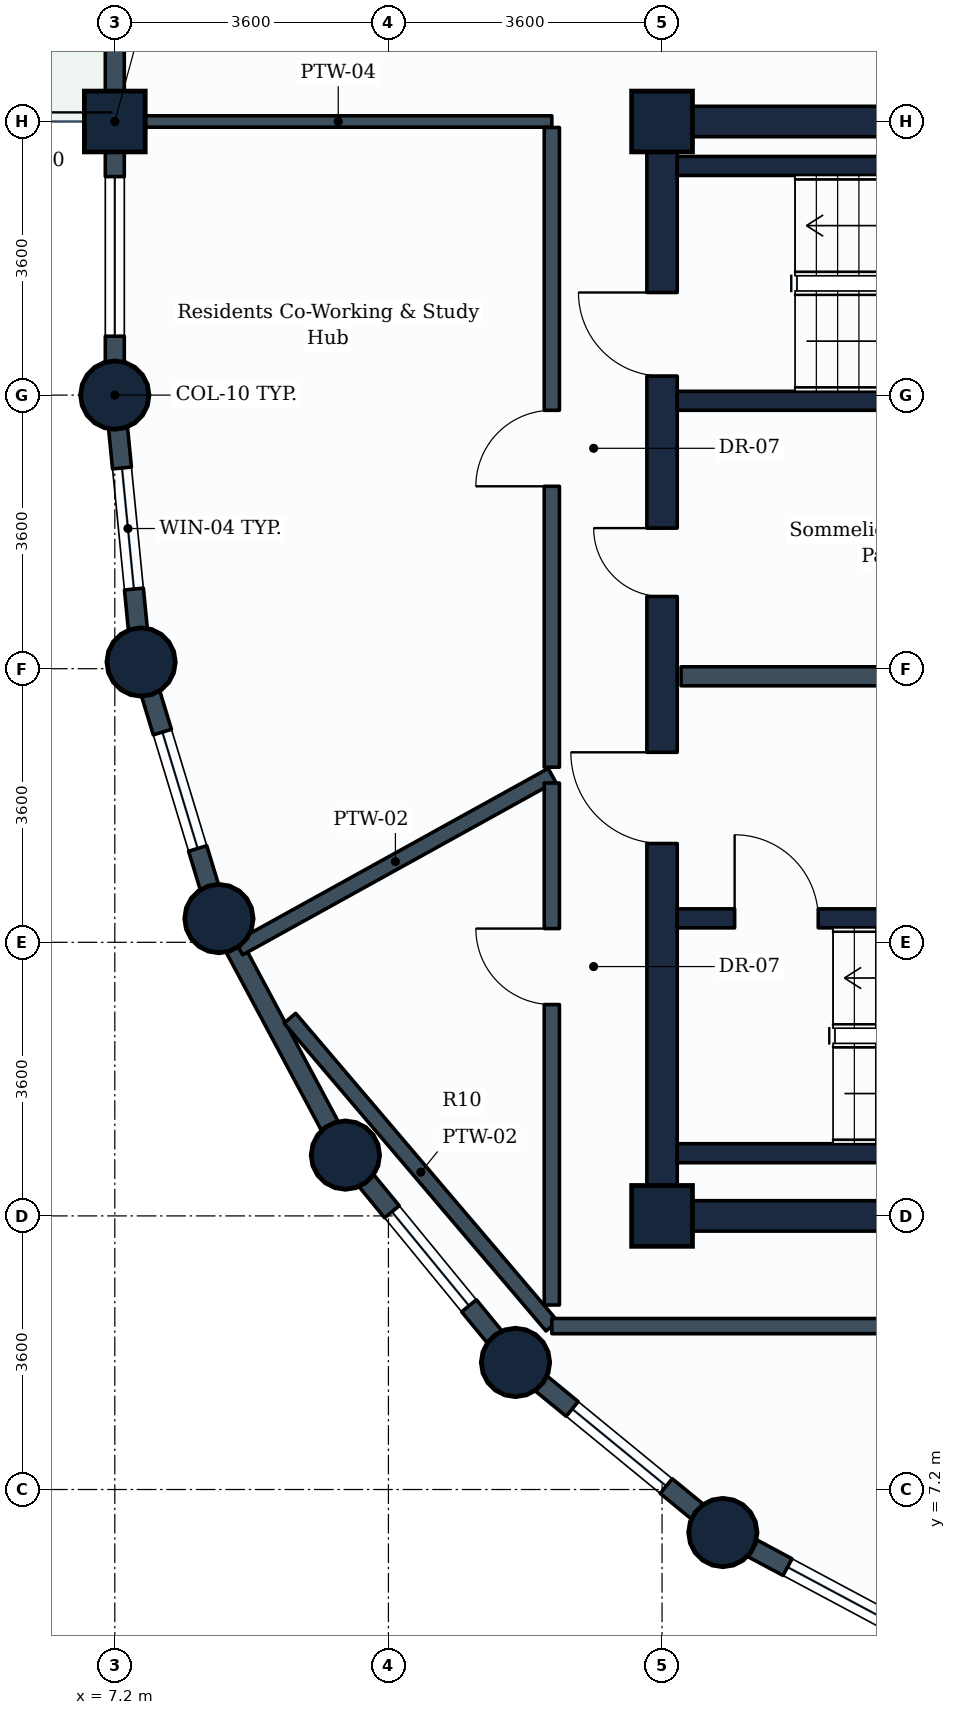
"""IFC4 building model, lengths in metres.
Left out: names, types, materials, properties, quantities, classifications, styles, units other than length and angle.
Written with IfcOpenShell. Run it as: python <this file> out.ifc"""

import sys

from ifc_helpers import new_model, si_unit, direction, frame, frame_2d, origin, origin_2d, place, context, subcontext, project, spatial, rectangle, circle, extrude, element, fill, save


model = new_model("IFC4")
c1 = context("Model", 3, precision=1e-05, world=origin(), true_north=direction((0.0, 1.0)))
c2 = subcontext(c1, "Body", "Model", "MODEL_VIEW")
j1 = project(units=[si_unit("LENGTHUNIT", "METRE"), si_unit("PLANEANGLEUNIT", "RADIAN")], contexts=[c1])
p1 = place(None, origin())
s1 = spatial("IfcSite", under=j1, at=p1, CompositionType="ELEMENT")
p2 = place(p1, origin())
s2 = spatial("IfcBuilding", under=s1, at=p2, CompositionType="ELEMENT")
p3 = place(p2, frame((0.0, 0.0, 270.2)))
s3 = spatial("IfcBuildingStorey", under=s2, at=p3, CompositionType="ELEMENT", Elevation=270.2)
p4 = place(p3, frame((7.2, 21.6, 0.0), z_axis=(0.0, 0.0, 1.0), x_axis=(1.0, 0.0, 0.0)))
e1 = element("IfcColumn", 1, at=p4, inside=s3, PredefinedType="COLUMN", context=c2, shape_type="SweptSolid", body=[
    extrude(circle(Radius=0.45, at=origin_2d()), origin(), (0.0, 0.0, 1.0), 3.6),
])
p5 = place(p3, frame((7.2, 25.2, 0.0), z_axis=(0.0, 0.0, 1.0), x_axis=(0.0, 1.0, 0.0)))
e2 = element("IfcColumn", 2, at=p5, inside=s3, PredefinedType="COLUMN", context=c2, shape_type="SweptSolid", body=[
    extrude(rectangle(XDim=0.8, YDim=0.8, at=origin_2d()), origin(), (0.0, 0.0, 1.0), 3.6),
])
for number, where, z_axis, x_axis in (
    (3, (7.546, 18.088, 0.0), (0.0, 0.0, 1.0), (1.0, 0.0, 0.0)),
    (4, (8.57, 14.712, 0.0), (0.0, 0.0, 1.0), (1.0, 0.0, 0.0)),
    (5, (10.234, 11.6, 0.0), (0.0, 0.0, 1.0), (1.0, 0.0, 0.0)),
    (6, (12.472, 8.872, 0.0), (0.0, 0.0, 1.0), (1.0, 0.0, 0.0)),
):
    element("IfcColumn", number, at=place(p3, frame(where, z_axis=z_axis, x_axis=x_axis)), inside=s3, PredefinedType="COLUMN", context=c2, shape_type="SweptSolid", body=[
        extrude(circle(Radius=0.45, at=origin_2d()), origin(), (0.0, 0.0, 1.0), 3.6),
    ])
for number, where, z_axis, x_axis in (
    (7, (14.4, 10.8, 0.0), (0.0, 0.0, 1.0), (1.0, 0.0, 0.0)),
    (8, (14.4, 25.2, 0.0), (0.0, 0.0, 1.0), (1.0, 0.0, 0.0)),
):
    element("IfcColumn", number, at=place(p3, frame(where, z_axis=z_axis, x_axis=x_axis)), inside=s3, PredefinedType="COLUMN", context=c2, shape_type="SweptSolid", body=[
        extrude(rectangle(XDim=0.8, YDim=0.8, at=origin_2d()), origin(), (0.0, 0.0, 1.0), 3.6),
    ])
p6 = place(p3, frame((15.2, 6.634, 0.0), z_axis=(0.0, 0.0, 1.0), x_axis=(1.0, 0.0, 0.0)))
e9 = element("IfcColumn", 9, at=p6, inside=s3, PredefinedType="COLUMN", context=c2, shape_type="SweptSolid", body=[
    extrude(circle(Radius=0.45, at=origin_2d()), origin(), (0.0, 0.0, 1.0), 3.6),
])
p7 = place(p3, frame((7.2, 25.2, 0.0), z_axis=(0.0, 0.0, 1.0), x_axis=(0.0, 1.0, 0.0)))
e10 = element("IfcWall", 10, at=p7, inside=s3, PredefinedType="STANDARD", context=c2, shape_type="SweptSolid", body=[
    extrude(rectangle(XDim=3.6, YDim=0.25, at=frame_2d((1.8, 0.0))), origin(), (0.0, 0.0, 1.0), 2.83),
])
p8 = place(p7, frame((2.032, 0.0, 0.0)))
e11 = element("IfcOpeningElement", 11, at=p8, cuts=e10, PredefinedType="OPENING", context=c2, shape_type="SweptSolid", body=[
    extrude(rectangle(XDim=1.0, YDim=2.1, at=frame_2d((0.5, 1.05))), frame((0.0, 0.135, 0.0), z_axis=(0.0, -1.0, 0.0), x_axis=(1.0, 0.0, 0.0)), (0.0, 0.0, 1.0), 0.27),
])
p9 = place(p3, frame((7.2, 21.6, 0.0), z_axis=(0.0, 0.0, 1.0), x_axis=(0.0, 1.0, 0.0)))
e12 = element("IfcWall", 12, at=p9, inside=s3, PredefinedType="STANDARD", context=c2, shape_type="SweptSolid", body=[
    extrude(rectangle(XDim=3.6, YDim=0.25, at=frame_2d((1.8, 0.0))), origin(), (0.0, 0.0, 1.0), 2.83),
])
p10 = place(p9, frame((0.775, 0.0, 0.85)))
e13 = element("IfcOpeningElement", 13, at=p10, cuts=e12, PredefinedType="OPENING", context=c2, shape_type="SweptSolid", body=[
    extrude(rectangle(XDim=2.1, YDim=1.35, at=frame_2d((1.05, 0.675))), frame((0.0, 0.135, 0.0), z_axis=(0.0, -1.0, 0.0), x_axis=(1.0, 0.0, 0.0)), (0.0, 0.0, 1.0), 0.27),
])
p11 = place(p3, frame((7.546, 18.088, 0.0), z_axis=(0.0, 0.0, 1.0), x_axis=(-0.09802417461, 0.995184033831, 0.0)))
e14 = element("IfcWall", 14, at=p11, inside=s3, PredefinedType="STANDARD", context=c2, shape_type="SweptSolid", body=[
    extrude(rectangle(XDim=3.529, YDim=0.25, at=frame_2d((1.765, 0.0))), origin(), (0.0, 0.0, 1.0), 2.83),
])
p12 = place(p11, frame((0.965, 0.0, 0.85)))
e15 = element("IfcOpeningElement", 15, at=p12, cuts=e14, PredefinedType="OPENING", context=c2, shape_type="SweptSolid", body=[
    extrude(rectangle(XDim=1.6, YDim=1.35, at=frame_2d((0.8, 0.675))), frame((0.0, 0.135, 0.0), z_axis=(0.0, -1.0, 0.0), x_axis=(1.0, 0.0, 0.0)), (0.0, 0.0, 1.0), 0.27),
])
p13 = place(p3, frame((8.57, 14.712, 0.0), z_axis=(0.0, 0.0, 1.0), x_axis=(-0.290305086481, 0.956934144423, 0.0)))
e16 = element("IfcWall", 16, at=p13, inside=s3, PredefinedType="STANDARD", context=c2, shape_type="SweptSolid", body=[
    extrude(rectangle(XDim=3.528, YDim=0.25, at=frame_2d((1.764, 0.0))), origin(), (0.0, 0.0, 1.0), 2.83),
])
p14 = place(p13, frame((0.964, 0.0, 0.85)))
e17 = element("IfcOpeningElement", 17, at=p14, cuts=e16, PredefinedType="OPENING", context=c2, shape_type="SweptSolid", body=[
    extrude(rectangle(XDim=1.6, YDim=1.35, at=frame_2d((0.8, 0.675))), frame((0.0, 0.135, 0.0), z_axis=(0.0, -1.0, 0.0), x_axis=(1.0, 0.0, 0.0)), (0.0, 0.0, 1.0), 0.27),
])
p15 = place(p3, frame((10.234, 11.6, 0.0), z_axis=(0.0, 0.0, 1.0), x_axis=(-0.47151087309, 0.881860247748, 0.0)))
e18 = element("IfcWall", 18, at=p15, inside=s3, PredefinedType="STANDARD", context=c2, shape_type="SweptSolid", body=[
    extrude(rectangle(XDim=3.529, YDim=0.25, at=frame_2d((1.764, 0.0))), origin(), (0.0, 0.0, 1.0), 2.83),
])
p16 = place(p3, frame((12.472, 8.872, 0.0), z_axis=(0.0, 0.0, 1.0), x_axis=(-0.634258295121, 0.773121216285, 0.0)))
e19 = element("IfcWall", 19, at=p16, inside=s3, PredefinedType="STANDARD", context=c2, shape_type="SweptSolid", body=[
    extrude(rectangle(XDim=3.529, YDim=0.25, at=frame_2d((1.764, 0.0))), origin(), (0.0, 0.0, 1.0), 2.83),
])
p17 = place(p16, frame((0.964, 0.0, 0.85)))
e20 = element("IfcOpeningElement", 20, at=p17, cuts=e19, PredefinedType="OPENING", context=c2, shape_type="SweptSolid", body=[
    extrude(rectangle(XDim=1.6, YDim=1.35, at=frame_2d((0.8, 0.675))), frame((0.0, 0.135, 0.0), z_axis=(0.0, -1.0, 0.0), x_axis=(1.0, 0.0, 0.0)), (0.0, 0.0, 1.0), 0.27),
])
p18 = place(p3, frame((15.2, 6.634, 0.0), z_axis=(0.0, 0.0, 1.0), x_axis=(-0.773121216285, 0.634258295121, 0.0)))
e21 = element("IfcWall", 21, at=p18, inside=s3, PredefinedType="STANDARD", context=c2, shape_type="SweptSolid", body=[
    extrude(rectangle(XDim=3.529, YDim=0.25, at=frame_2d((1.764, 0.0))), origin(), (0.0, 0.0, 1.0), 2.83),
])
p19 = place(p18, frame((0.964, 0.0, 0.85)))
e22 = element("IfcOpeningElement", 22, at=p19, cuts=e21, PredefinedType="OPENING", context=c2, shape_type="SweptSolid", body=[
    extrude(rectangle(XDim=1.6, YDim=1.35, at=frame_2d((0.8, 0.675))), frame((0.0, 0.135, 0.0), z_axis=(0.0, -1.0, 0.0), x_axis=(1.0, 0.0, 0.0)), (0.0, 0.0, 1.0), 0.27),
])
p20 = place(p3, frame((18.312, 4.97, 0.0), z_axis=(0.0, 0.0, 1.0), x_axis=(-0.881846862014, 0.471535907389, 0.0)))
e23 = element("IfcWall", 23, at=p20, inside=s3, PredefinedType="STANDARD", context=c2, shape_type="SweptSolid", body=[
    extrude(rectangle(XDim=3.529, YDim=0.25, at=frame_2d((1.765, 0.0))), origin(), (0.0, 0.0, 1.0), 2.83),
])
p21 = place(p20, frame((0.964, 0.0, 0.85)))
e24 = element("IfcOpeningElement", 24, at=p21, cuts=e23, PredefinedType="OPENING", context=c2, shape_type="SweptSolid", body=[
    extrude(rectangle(XDim=1.6, YDim=1.35, at=frame_2d((0.8, 0.675))), frame((0.0, 0.135, 0.0), z_axis=(0.0, -1.0, 0.0), x_axis=(1.0, 0.0, 0.0)), (0.0, 0.0, 1.0), 0.27),
])
p22 = place(p3, frame((14.4, 10.8, 0.0), z_axis=(0.0, 0.0, 1.0), x_axis=(1.0, 0.0, 0.0)))
e25 = element("IfcWall", 25, at=p22, inside=s3, PredefinedType="SHEAR", context=c2, shape_type="SweptSolid", body=[
    extrude(rectangle(XDim=18.0, YDim=0.4, at=frame_2d((9.0, 0.0))), origin(), (0.0, 0.0, 1.0), 3.35),
])
p23 = place(p3, frame((14.4, 25.2, 0.0), z_axis=(0.0, 0.0, 1.0), x_axis=(1.0, 0.0, 0.0)))
e26 = element("IfcWall", 26, at=p23, inside=s3, PredefinedType="SHEAR", context=c2, shape_type="SweptSolid", body=[
    extrude(rectangle(XDim=10.8, YDim=0.4, at=frame_2d((5.4, 0.0))), origin(), (0.0, 0.0, 1.0), 3.35),
])
p24 = place(p3, frame((14.4, 10.8, 0.0), z_axis=(0.0, 0.0, 1.0), x_axis=(0.0, 1.0, 0.0)))
e27 = element("IfcWall", 27, at=p24, inside=s3, PredefinedType="SHEAR", context=c2, shape_type="SweptSolid", body=[
    extrude(rectangle(XDim=14.4, YDim=0.4, at=frame_2d((7.2, 0.0))), origin(), (0.0, 0.0, 1.0), 3.35),
])
p25 = place(p24, frame((11.05, 0.0, 0.0)))
e28 = element("IfcOpeningElement", 28, at=p25, cuts=e27, PredefinedType="OPENING", context=c2, shape_type="SweptSolid", body=[
    extrude(rectangle(XDim=1.1, YDim=2.1, at=frame_2d((0.55, 1.05))), frame((0.0, 0.21, 0.0), z_axis=(0.0, -1.0, 0.0), x_axis=(1.0, 0.0, 0.0)), (0.0, 0.0, 1.0), 0.42),
])
p26 = place(p24, frame((4.9, 0.0, 0.0)))
e29 = element("IfcOpeningElement", 29, at=p26, cuts=e27, PredefinedType="OPENING", context=c2, shape_type="SweptSolid", body=[
    extrude(rectangle(XDim=1.2, YDim=2.1, at=frame_2d((0.6, 1.05))), frame((0.0, 0.21, 0.0), z_axis=(0.0, -1.0, 0.0), x_axis=(1.0, 0.0, 0.0)), (0.0, 0.0, 1.0), 0.42),
])
p27 = place(p24, frame((8.15, 0.0, 0.0)))
e30 = element("IfcOpeningElement", 30, at=p27, cuts=e27, PredefinedType="OPENING", context=c2, shape_type="SweptSolid", body=[
    extrude(rectangle(XDim=0.9, YDim=2.1, at=frame_2d((0.45, 1.05))), frame((0.0, 0.21, 0.0), z_axis=(0.0, -1.0, 0.0), x_axis=(1.0, 0.0, 0.0)), (0.0, 0.0, 1.0), 0.42),
])
p28 = place(p3, frame((14.6, 11.625, 0.0), z_axis=(0.0, 0.0, 1.0), x_axis=(1.0, 0.0, 0.0)))
e31 = element("IfcWall", 31, at=p28, inside=s3, PredefinedType="SHEAR", context=c2, shape_type="SweptSolid", body=[
    extrude(rectangle(XDim=8.75, YDim=0.25, at=frame_2d((4.375, 0.0))), origin(), (0.0, 0.0, 1.0), 3.35),
])
p29 = place(p3, frame((14.6, 14.715, 0.0), z_axis=(0.0, 0.0, 1.0), x_axis=(1.0, 0.0, 0.0)))
e32 = element("IfcWall", 32, at=p29, inside=s3, PredefinedType="SHEAR", context=c2, shape_type="SweptSolid", body=[
    extrude(rectangle(XDim=8.75, YDim=0.25, at=frame_2d((4.375, 0.0))), origin(), (0.0, 0.0, 1.0), 3.35),
])
p30 = place(p29, frame((0.755, 0.0, 0.0)))
e33 = element("IfcOpeningElement", 33, at=p30, cuts=e32, PredefinedType="OPENING", context=c2, shape_type="SweptSolid", body=[
    extrude(rectangle(XDim=1.1, YDim=2.1, at=frame_2d((0.55, 1.05))), frame((0.0, 0.135, 0.0), z_axis=(0.0, -1.0, 0.0), x_axis=(1.0, 0.0, 0.0)), (0.0, 0.0, 1.0), 0.27),
])
for number, where, z_axis, x_axis in (
    (34, (14.6, 21.525, 0.0), (0.0, 0.0, 1.0), (1.0, 0.0, 0.0)),
    (35, (14.6, 24.615, 0.0), (0.0, 0.0, 1.0), (1.0, 0.0, 0.0)),
):
    element("IfcWall", number, at=place(p3, frame(where, z_axis=z_axis, x_axis=x_axis)), inside=s3, PredefinedType="SHEAR", context=c2, shape_type="SweptSolid", body=[
        extrude(rectangle(XDim=8.3, YDim=0.25, at=frame_2d((4.15, 0.0))), origin(), (0.0, 0.0, 1.0), 3.35),
    ])
p31 = place(p3, frame((14.65, 17.9, 0.0), z_axis=(0.0, 0.0, 1.0), x_axis=(1.0, 0.0, 0.0)))
e36 = element("IfcWall", 36, at=p31, inside=s3, PredefinedType="PARTITIONING", context=c2, shape_type="SweptSolid", body=[
    extrude(rectangle(XDim=7.15, YDim=0.25, at=frame_2d((3.575, 0.0))), origin(), (0.0, 0.0, 1.0), 3.335),
])
p32 = place(p3, frame((7.329, 25.2, 0.0), z_axis=(0.0, 0.0, 1.0), x_axis=(1.0, 0.0, 0.0)))
e37 = element("IfcWall", 37, at=p32, inside=s3, PredefinedType="PARTITIONING", context=c2, shape_type="SweptSolid", body=[
    extrude(rectangle(XDim=5.621, YDim=0.15, at=frame_2d((2.811, 0.0))), origin(), (0.0, 0.0, 1.0), 3.335),
])
p33 = place(p3, frame((12.95, 9.35, 0.0), z_axis=(0.0, 0.0, 1.0), x_axis=(-0.648016103597, 0.761626633908, 0.0)))
e38 = element("IfcWall", 38, at=p33, inside=s3, PredefinedType="PARTITIONING", context=c2, shape_type="SweptSolid", body=[
    extrude(rectangle(XDim=5.319, YDim=0.2, at=frame_2d((2.659, 0.0))), origin(), (0.0, 0.0, 1.0), 2.83),
])
p34 = place(p3, frame((12.95, 16.6, 0.0), z_axis=(0.0, 0.0, 1.0), x_axis=(-0.874941893529, -0.484227924586, 0.0)))
e39 = element("IfcWall", 39, at=p34, inside=s3, PredefinedType="PARTITIONING", context=c2, shape_type="SweptSolid", body=[
    extrude(rectangle(XDim=4.705, YDim=0.2, at=frame_2d((2.352, 0.0))), origin(), (0.0, 0.0, 1.0), 2.83),
])
p35 = place(p3, frame((12.95, 16.704, 0.0), z_axis=(0.0, 0.0, 1.0), x_axis=(0.0, 1.0, 0.0)))
e40 = element("IfcWall", 40, at=p35, inside=s3, PredefinedType="PARTITIONING", context=c2, shape_type="SweptSolid", body=[
    extrude(rectangle(XDim=8.417, YDim=0.2, at=frame_2d((4.208, 0.0))), origin(), (0.0, 0.0, 1.0), 3.02),
])
p36 = place(p35, frame((3.696, 0.0, 0.0)))
e41 = element("IfcOpeningElement", 41, at=p36, cuts=e40, PredefinedType="OPENING", context=c2, shape_type="SweptSolid", body=[
    extrude(rectangle(XDim=1.0, YDim=2.1, at=frame_2d((0.5, 1.05))), frame((0.0, 0.11, 0.0), z_axis=(0.0, -1.0, 0.0), x_axis=(1.0, 0.0, 0.0)), (0.0, 0.0, 1.0), 0.22),
])
p37 = place(p3, frame((12.95, 9.628, 0.0), z_axis=(0.0, 0.0, 1.0), x_axis=(0.0, 1.0, 0.0)))
e42 = element("IfcWall", 42, at=p37, inside=s3, PredefinedType="PARTITIONING", context=c2, shape_type="SweptSolid", body=[
    extrude(rectangle(XDim=6.868, YDim=0.2, at=frame_2d((3.434, 0.0))), origin(), (0.0, 0.0, 1.0), 3.03),
])
p38 = place(p37, frame((3.953, 0.0, 0.0)))
e43 = element("IfcOpeningElement", 43, at=p38, cuts=e42, PredefinedType="OPENING", context=c2, shape_type="SweptSolid", body=[
    extrude(rectangle(XDim=1.0, YDim=2.1, at=frame_2d((0.5, 1.05))), frame((0.0, 0.11, 0.0), z_axis=(0.0, -1.0, 0.0), x_axis=(1.0, 0.0, 0.0)), (0.0, 0.0, 1.0), 0.22),
])
p39 = place(p3, frame((12.95, 9.35, 0.0), z_axis=(0.0, 0.0, 1.0), x_axis=(1.0, 0.0, 0.0)))
e44 = element("IfcWall", 44, at=p39, inside=s3, PredefinedType="PARTITIONING", context=c2, shape_type="SweptSolid", body=[
    extrude(rectangle(XDim=15.771, YDim=0.2, at=frame_2d((7.885, 0.0))), origin(), (0.0, 0.0, 1.0), 3.02),
])
p40 = place(p39, frame((4.836, 0.0, 0.0)))
e45 = element("IfcOpeningElement", 45, at=p40, cuts=e44, PredefinedType="OPENING", context=c2, shape_type="SweptSolid", body=[
    extrude(rectangle(XDim=1.0, YDim=2.1, at=frame_2d((0.5, 1.05))), frame((0.0, 0.11, 0.0), z_axis=(0.0, -1.0, 0.0), x_axis=(1.0, 0.0, 0.0)), (0.0, 0.0, 1.0), 0.22),
])
p41 = place(p10, origin())
e46 = element("IfcWindow", 46, at=p41, inside=s3, PartitioningType="SINGLE_PANEL", PredefinedType="WINDOW", context=c2, shape_type="SweptSolid", body=[
    extrude(rectangle(XDim=2.1, YDim=1.35, at=frame_2d((1.05, 0.675))), frame((0.0, 0.03, 0.0), z_axis=(0.0, -1.0, 0.0), x_axis=(1.0, 0.0, 0.0)), (0.0, 0.0, 1.0), 0.06),
])
fill(e13, e46)
p42 = place(p12, origin())
e47 = element("IfcWindow", 47, at=p42, inside=s3, PartitioningType="SINGLE_PANEL", PredefinedType="WINDOW", context=c2, shape_type="SweptSolid", body=[
    extrude(rectangle(XDim=1.6, YDim=1.35, at=frame_2d((0.8, 0.675))), frame((0.0, 0.03, 0.0), z_axis=(0.0, -1.0, 0.0), x_axis=(1.0, 0.0, 0.0)), (0.0, 0.0, 1.0), 0.06),
])
fill(e15, e47)
p43 = place(p14, origin())
e48 = element("IfcWindow", 48, at=p43, inside=s3, PartitioningType="SINGLE_PANEL", PredefinedType="WINDOW", context=c2, shape_type="SweptSolid", body=[
    extrude(rectangle(XDim=1.6, YDim=1.35, at=frame_2d((0.8, 0.675))), frame((0.0, 0.03, 0.0), z_axis=(0.0, -1.0, 0.0), x_axis=(1.0, 0.0, 0.0)), (0.0, 0.0, 1.0), 0.06),
])
fill(e17, e48)
p44 = place(p17, origin())
e49 = element("IfcWindow", 49, at=p44, inside=s3, PartitioningType="SINGLE_PANEL", PredefinedType="WINDOW", context=c2, shape_type="SweptSolid", body=[
    extrude(rectangle(XDim=1.6, YDim=1.35, at=frame_2d((0.8, 0.675))), frame((0.0, 0.03, 0.0), z_axis=(0.0, -1.0, 0.0), x_axis=(1.0, 0.0, 0.0)), (0.0, 0.0, 1.0), 0.06),
])
fill(e20, e49)
p45 = place(p19, origin())
e50 = element("IfcWindow", 50, at=p45, inside=s3, PartitioningType="SINGLE_PANEL", PredefinedType="WINDOW", context=c2, shape_type="SweptSolid", body=[
    extrude(rectangle(XDim=1.6, YDim=1.35, at=frame_2d((0.8, 0.675))), frame((0.0, 0.03, 0.0), z_axis=(0.0, -1.0, 0.0), x_axis=(1.0, 0.0, 0.0)), (0.0, 0.0, 1.0), 0.06),
])
fill(e22, e50)
p46 = place(p21, origin())
e51 = element("IfcWindow", 51, at=p46, inside=s3, PartitioningType="SINGLE_PANEL", PredefinedType="WINDOW", context=c2, shape_type="SweptSolid", body=[
    extrude(rectangle(XDim=1.6, YDim=1.35, at=frame_2d((0.8, 0.675))), frame((0.0, 0.03, 0.0), z_axis=(0.0, -1.0, 0.0), x_axis=(1.0, 0.0, 0.0)), (0.0, 0.0, 1.0), 0.06),
])
fill(e24, e51)
p47 = place(p30, origin())
e52 = element("IfcDoor", 52, at=p47, inside=s3, OperationType="SINGLE_SWING_LEFT", PredefinedType="DOOR", context=c2, shape_type="SweptSolid", body=[
    extrude(rectangle(XDim=1.1, YDim=2.1, at=frame_2d((0.55, 1.05))), frame((0.0, 0.025, 0.0), z_axis=(0.0, -1.0, 0.0), x_axis=(1.0, 0.0, 0.0)), (0.0, 0.0, 1.0), 0.05),
])
fill(e33, e52)
p48 = place(p25, origin())
e53 = element("IfcDoor", 53, at=p48, inside=s3, OperationType="SINGLE_SWING_RIGHT", PredefinedType="DOOR", context=c2, shape_type="SweptSolid", body=[
    extrude(rectangle(XDim=1.1, YDim=2.1, at=frame_2d((0.55, 1.05))), frame((0.0, 0.025, 0.0), z_axis=(0.0, -1.0, 0.0), x_axis=(1.0, 0.0, 0.0)), (0.0, 0.0, 1.0), 0.05),
])
fill(e28, e53)
p49 = place(p26, origin())
e54 = element("IfcDoor", 54, at=p49, inside=s3, OperationType="SINGLE_SWING_RIGHT", PredefinedType="DOOR", context=c2, shape_type="SweptSolid", body=[
    extrude(rectangle(XDim=1.2, YDim=2.1, at=frame_2d((0.6, 1.05))), frame((0.0, 0.025, 0.0), z_axis=(0.0, -1.0, 0.0), x_axis=(1.0, 0.0, 0.0)), (0.0, 0.0, 1.0), 0.05),
])
fill(e29, e54)
p50 = place(p27, origin())
e55 = element("IfcDoor", 55, at=p50, inside=s3, OperationType="SINGLE_SWING_RIGHT", PredefinedType="DOOR", context=c2, shape_type="SweptSolid", body=[
    extrude(rectangle(XDim=0.9, YDim=2.1, at=frame_2d((0.45, 1.05))), frame((0.0, 0.025, 0.0), z_axis=(0.0, -1.0, 0.0), x_axis=(1.0, 0.0, 0.0)), (0.0, 0.0, 1.0), 0.05),
])
fill(e30, e55)
p51 = place(p36, origin())
e56 = element("IfcDoor", 56, at=p51, inside=s3, OperationType="SINGLE_SWING_LEFT", PredefinedType="DOOR", context=c2, shape_type="SweptSolid", body=[
    extrude(rectangle(XDim=1.0, YDim=2.1, at=frame_2d((0.5, 1.05))), frame((0.0, 0.025, 0.0), z_axis=(0.0, -1.0, 0.0), x_axis=(1.0, 0.0, 0.0)), (0.0, 0.0, 1.0), 0.05),
])
fill(e41, e56)
p52 = place(p38, origin())
e57 = element("IfcDoor", 57, at=p52, inside=s3, OperationType="SINGLE_SWING_RIGHT", PredefinedType="DOOR", context=c2, shape_type="SweptSolid", body=[
    extrude(rectangle(XDim=1.0, YDim=2.1, at=frame_2d((0.5, 1.05))), frame((0.0, 0.025, 0.0), z_axis=(0.0, -1.0, 0.0), x_axis=(1.0, 0.0, 0.0)), (0.0, 0.0, 1.0), 0.05),
])
fill(e43, e57)
save(model, sys.argv[1])
